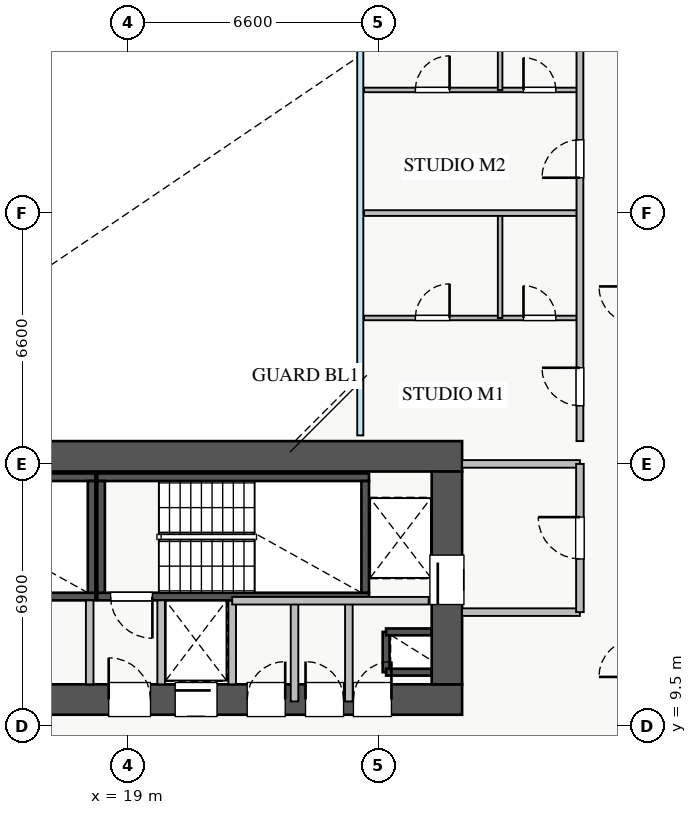
"""IFC4 building model, lengths in metres.
Left out: names, types, materials, properties, quantities, classifications, styles, units other than length and angle.
Written with IfcOpenShell. Run it as: python <this file> out.ifc"""

import sys

from ifc_helpers import new_model, si_unit, direction, frame, frame_2d, origin, place, context, subcontext, project, spatial, rectangle, extrude, source, transform, mapped, element, fill, save


model = new_model("IFC4")
c1 = context("Model", 3, precision=1e-05, world=origin(), true_north=direction((0.0, 1.0)))
c2 = subcontext(c1, "Body", "Model", "MODEL_VIEW")
j1 = project(units=[si_unit("LENGTHUNIT", "METRE"), si_unit("PLANEANGLEUNIT", "RADIAN")], contexts=[c1])
p1 = place(None, origin())
s1 = spatial("IfcSite", under=j1, at=p1, CompositionType="ELEMENT")
p2 = place(p1, origin())
s2 = spatial("IfcBuilding", under=s1, at=p2, CompositionType="ELEMENT")
p3 = place(p2, frame((0.0, 0.0, 56.75)))
s3 = spatial("IfcBuildingStorey", under=s2, at=p3, CompositionType="ELEMENT", Elevation=56.75)
p4 = place(p3, frame((25.8, 10.92, 0.0), z_axis=(0.0, 0.0, 1.0), x_axis=(0.0, 1.0, 0.0)))
e1 = element("IfcWall", 1, at=p4, inside=s3, PredefinedType="SHEAR", context=c2, shape_type="SweptSolid", body=[
    extrude(rectangle(XDim=1.06, YDim=0.18, at=frame_2d((0.53, 0.0))), origin(), (0.0, 0.0, 1.0), 3.07),
])
for number, where, z_axis, x_axis in (
    (2, (25.8, 11.98, 0.0), (0.0, 0.0, 1.0), (1.0, 0.0, 0.0)),
    (3, (25.8, 10.92, 0.0), (0.0, 0.0, 1.0), (1.0, 0.0, 0.0)),
):
    element("IfcWall", number, at=place(p3, frame(where, z_axis=z_axis, x_axis=x_axis)), inside=s3, PredefinedType="SHEAR", context=c2, shape_type="SweptSolid", body=[
        extrude(rectangle(XDim=1.2, YDim=0.18, at=frame_2d((0.6, 0.0))), origin(), (0.0, 0.0, 1.0), 3.07),
    ])
p5 = place(p3, frame((19.88, 12.8, 0.0), z_axis=(0.0, 0.0, 1.0), x_axis=(1.0, 0.0, 0.0)))
e4 = element("IfcWall", 4, at=p5, inside=s3, PredefinedType="SHEAR", context=c2, shape_type="SweptSolid", body=[
    extrude(rectangle(XDim=1.87, YDim=0.18, at=frame_2d((0.935, 0.0))), origin(), (0.0, 0.0, 1.0), 3.07),
])
p6 = place(p3, frame((11.0, 12.91, 0.0), z_axis=(0.0, 0.0, 1.0), x_axis=(1.0, 0.0, 0.0)))
e5 = element("IfcWall", 5, at=p6, inside=s3, PredefinedType="SHEAR", context=c2, shape_type="SweptSolid", body=[
    extrude(rectangle(XDim=7.15, YDim=0.2, at=frame_2d((3.575, 0.0))), origin(), (0.0, 0.0, 1.0), 3.25),
])
p7 = place(p6, frame((0.35, 0.0, 0.0)))
e6 = element("IfcOpeningElement", 6, at=p7, cuts=e5, PredefinedType="OPENING", context=c2, shape_type="SweptSolid", body=[
    extrude(rectangle(XDim=1.1, YDim=2.05, at=frame_2d((0.55, 1.025))), frame((0.0, 0.11, 0.0), z_axis=(0.0, -1.0, 0.0), x_axis=(1.0, 0.0, 0.0)), (0.0, 0.0, 1.0), 0.22),
])
p8 = place(p3, frame((11.0, 16.05, 0.0), z_axis=(0.0, 0.0, 1.0), x_axis=(1.0, 0.0, 0.0)))
e7 = element("IfcWall", 7, at=p8, inside=s3, PredefinedType="SHEAR", context=c2, shape_type="SweptSolid", body=[
    extrude(rectangle(XDim=7.15, YDim=0.2, at=frame_2d((3.575, 0.0))), origin(), (0.0, 0.0, 1.0), 3.25),
])
p9 = place(p3, frame((18.05, 13.01, 0.0), z_axis=(0.0, 0.0, 1.0), x_axis=(0.0, 1.0, 0.0)))
e8 = element("IfcWall", 8, at=p9, inside=s3, PredefinedType="SHEAR", context=c2, shape_type="SweptSolid", body=[
    extrude(rectangle(XDim=2.94, YDim=0.2, at=frame_2d((1.47, 0.0))), origin(), (0.0, 0.0, 1.0), 3.25),
])
p10 = place(p3, frame((18.2, 12.91, 0.0), z_axis=(0.0, 0.0, 1.0), x_axis=(1.0, 0.0, 0.0)))
e9 = element("IfcWall", 9, at=p10, inside=s3, PredefinedType="SHEAR", context=c2, shape_type="SweptSolid", body=[
    extrude(rectangle(XDim=7.15, YDim=0.2, at=frame_2d((3.575, 0.0))), origin(), (0.0, 0.0, 1.0), 3.25),
])
p11 = place(p10, frame((0.35, 0.0, 0.0)))
e10 = element("IfcOpeningElement", 10, at=p11, cuts=e9, PredefinedType="OPENING", context=c2, shape_type="SweptSolid", body=[
    extrude(rectangle(XDim=1.1, YDim=2.05, at=frame_2d((0.55, 1.025))), frame((0.0, 0.11, 0.0), z_axis=(0.0, -1.0, 0.0), x_axis=(1.0, 0.0, 0.0)), (0.0, 0.0, 1.0), 0.22),
])
p12 = place(p3, frame((18.2, 16.05, 0.0), z_axis=(0.0, 0.0, 1.0), x_axis=(1.0, 0.0, 0.0)))
e11 = element("IfcWall", 11, at=p12, inside=s3, PredefinedType="SHEAR", context=c2, shape_type="SweptSolid", body=[
    extrude(rectangle(XDim=7.15, YDim=0.2, at=frame_2d((3.575, 0.0))), origin(), (0.0, 0.0, 1.0), 3.25),
])
for number, where, z_axis, x_axis in (
    (12, (18.3, 13.01, 0.0), (0.0, 0.0, 1.0), (0.0, 1.0, 0.0)),
    (13, (25.25, 13.01, 0.0), (0.0, 0.0, 1.0), (0.0, 1.0, 0.0)),
):
    element("IfcWall", number, at=place(p3, frame(where, z_axis=z_axis, x_axis=x_axis)), inside=s3, PredefinedType="SHEAR", context=c2, shape_type="SweptSolid", body=[
        extrude(rectangle(XDim=2.94, YDim=0.2, at=frame_2d((1.47, 0.0))), origin(), (0.0, 0.0, 1.0), 3.25),
    ])
p13 = place(p3, frame((10.2, 10.2, 0.0), z_axis=(0.0, 0.0, 1.0), x_axis=(1.0, 0.0, 0.0)))
e14 = element("IfcWall", 14, at=p13, inside=s3, PredefinedType="SHEAR", context=c2, shape_type="SweptSolid", body=[
    extrude(rectangle(XDim=17.6, YDim=0.8, at=frame_2d((8.8, 0.0))), origin(), (0.0, 0.0, 1.0), 3.25),
])
p14 = place(p13, frame((1.15, 0.0, 0.0)))
e15 = element("IfcOpeningElement", 15, at=p14, cuts=e14, PredefinedType="OPENING", context=c2, shape_type="SweptSolid", body=[
    extrude(rectangle(XDim=1.1, YDim=2.05, at=frame_2d((0.55, 1.025))), frame((0.0, 0.41, 0.0), z_axis=(0.0, -1.0, 0.0), x_axis=(1.0, 0.0, 0.0)), (0.0, 0.0, 1.0), 0.82),
])
p15 = place(p13, frame((8.3, 0.0, 0.0)))
e16 = element("IfcOpeningElement", 16, at=p15, cuts=e14, PredefinedType="OPENING", context=c2, shape_type="SweptSolid", body=[
    extrude(rectangle(XDim=1.1, YDim=2.05, at=frame_2d((0.55, 1.025))), frame((0.0, 0.41, 0.0), z_axis=(0.0, -1.0, 0.0), x_axis=(1.0, 0.0, 0.0)), (0.0, 0.0, 1.0), 0.82),
])
p16 = place(p13, frame((10.05, 0.0, 0.0)))
e17 = element("IfcOpeningElement", 17, at=p16, cuts=e14, PredefinedType="OPENING", context=c2, shape_type="SweptSolid", body=[
    extrude(rectangle(XDim=1.1, YDim=2.05, at=frame_2d((0.55, 1.025))), frame((0.0, 0.41, 0.0), z_axis=(0.0, -1.0, 0.0), x_axis=(1.0, 0.0, 0.0)), (0.0, 0.0, 1.0), 0.82),
])
p17 = place(p13, frame((14.74, 0.0, 0.0)))
e18 = element("IfcOpeningElement", 18, at=p17, cuts=e14, PredefinedType="OPENING", context=c2, shape_type="SweptSolid", body=[
    extrude(rectangle(XDim=1.0, YDim=2.05, at=frame_2d((0.5, 1.025))), frame((0.0, 0.41, 0.0), z_axis=(0.0, -1.0, 0.0), x_axis=(1.0, 0.0, 0.0)), (0.0, 0.0, 1.0), 0.82),
])
p18 = place(p13, frame((11.945, 0.0, 0.0)))
e19 = element("IfcOpeningElement", 19, at=p18, cuts=e14, PredefinedType="OPENING", context=c2, shape_type="SweptSolid", body=[
    extrude(rectangle(XDim=1.0, YDim=2.05, at=frame_2d((0.5, 1.025))), frame((0.0, 0.41, 0.0), z_axis=(0.0, -1.0, 0.0), x_axis=(1.0, 0.0, 0.0)), (0.0, 0.0, 1.0), 0.82),
])
p19 = place(p13, frame((13.48, 0.0, 0.0)))
e20 = element("IfcOpeningElement", 20, at=p19, cuts=e14, PredefinedType="OPENING", context=c2, shape_type="SweptSolid", body=[
    extrude(rectangle(XDim=1.0, YDim=2.05, at=frame_2d((0.5, 1.025))), frame((0.0, 0.41, 0.0), z_axis=(0.0, -1.0, 0.0), x_axis=(1.0, 0.0, 0.0)), (0.0, 0.0, 1.0), 0.82),
])
p20 = place(p3, frame((10.2, 16.6, 0.0), z_axis=(0.0, 0.0, 1.0), x_axis=(1.0, 0.0, 0.0)))
e21 = element("IfcWall", 21, at=p20, inside=s3, PredefinedType="SHEAR", context=c2, shape_type="SweptSolid", body=[
    extrude(rectangle(XDim=17.6, YDim=0.8, at=frame_2d((8.8, 0.0))), origin(), (0.0, 0.0, 1.0), 3.25),
])
p21 = place(p3, frame((27.4, 10.6, 0.0), z_axis=(0.0, 0.0, 1.0), x_axis=(0.0, 1.0, 0.0)))
e22 = element("IfcWall", 22, at=p21, inside=s3, PredefinedType="SHEAR", context=c2, shape_type="SweptSolid", body=[
    extrude(rectangle(XDim=5.6, YDim=0.8, at=frame_2d((2.8, 0.0))), origin(), (0.0, 0.0, 1.0), 3.25),
])
p22 = place(p21, frame((2.1, 0.0, 0.0)))
e23 = element("IfcOpeningElement", 23, at=p22, cuts=e22, PredefinedType="OPENING", context=c2, shape_type="SweptSolid", body=[
    extrude(rectangle(XDim=1.3, YDim=2.05, at=frame_2d((0.65, 1.025))), frame((0.0, 0.41, 0.0), z_axis=(0.0, -1.0, 0.0), x_axis=(1.0, 0.0, 0.0)), (0.0, 0.0, 1.0), 0.82),
])
for number, where, z_axis, x_axis in (
    (24, (27.8, 16.4, 0.0), (0.0, 0.0, 1.0), (1.0, 0.0, 0.0)),
    (25, (27.8, 12.5, 0.0), (0.0, 0.0, 1.0), (1.0, 0.0, 0.0)),
):
    element("IfcWall", number, at=place(p3, frame(where, z_axis=z_axis, x_axis=x_axis)), inside=s3, PredefinedType="PARTITIONING", context=c2, shape_type="SweptSolid", body=[
        extrude(rectangle(XDim=3.1, YDim=0.2, at=frame_2d((1.55, 0.0))), origin(), (0.0, 0.0, 1.0), 3.07),
    ])
p23 = place(p3, frame((30.9, 12.5, 0.0), z_axis=(0.0, 0.0, 1.0), x_axis=(0.0, 1.0, 0.0)))
e26 = element("IfcWall", 26, at=p23, inside=s3, PredefinedType="PARTITIONING", context=c2, shape_type="SweptSolid", body=[
    extrude(rectangle(XDim=3.9, YDim=0.2, at=frame_2d((1.95, 0.0))), origin(), (0.0, 0.0, 1.0), 3.07),
])
p24 = place(p23, frame((1.4, 0.0, 0.0)))
e27 = element("IfcOpeningElement", 27, at=p24, cuts=e26, PredefinedType="OPENING", context=c2, shape_type="SweptSolid", body=[
    extrude(rectangle(XDim=1.1, YDim=2.05, at=frame_2d((0.55, 1.025))), frame((0.0, 0.11, 0.0), z_axis=(0.0, -1.0, 0.0), x_axis=(1.0, 0.0, 0.0)), (0.0, 0.0, 1.0), 0.22),
])
for number, where, z_axis, x_axis in (
    (28, (18.0, 10.6, 0.0), (0.0, 0.0, 1.0), (0.0, 1.0, 0.0)),
    (29, (19.88, 10.6, 0.0), (0.0, 0.0, 1.0), (0.0, 1.0, 0.0)),
):
    element("IfcWall", number, at=place(p3, frame(where, z_axis=z_axis, x_axis=x_axis)), inside=s3, PredefinedType="PARTITIONING", context=c2, shape_type="SweptSolid", body=[
        extrude(rectangle(XDim=2.21, YDim=0.2, at=frame_2d((1.105, 0.0))), origin(), (0.0, 0.0, 1.0), 3.07),
    ])
p25 = place(p3, frame((24.82, 10.15, 0.0), z_axis=(0.0, 0.0, 1.0), x_axis=(0.0, 1.0, 0.0)))
e30 = element("IfcWall", 30, at=p25, inside=s3, PredefinedType="PARTITIONING", context=c2, shape_type="SweptSolid", body=[
    extrude(rectangle(XDim=2.65, YDim=0.2, at=frame_2d((1.325, 0.0))), origin(), (0.0, 0.0, 1.0), 3.07),
])
p26 = place(p3, frame((21.75, 10.6, 0.0), z_axis=(0.0, 0.0, 1.0), x_axis=(0.0, 1.0, 0.0)))
e31 = element("IfcWall", 31, at=p26, inside=s3, PredefinedType="PARTITIONING", context=c2, shape_type="SweptSolid", body=[
    extrude(rectangle(XDim=2.2, YDim=0.2, at=frame_2d((1.1, 0.0))), origin(), (0.0, 0.0, 1.0), 3.07),
])
p27 = place(p3, frame((23.39, 10.15, 0.0), z_axis=(0.0, 0.0, 1.0), x_axis=(0.0, 1.0, 0.0)))
e32 = element("IfcWall", 32, at=p27, inside=s3, PredefinedType="PARTITIONING", context=c2, shape_type="SweptSolid", body=[
    extrude(rectangle(XDim=2.65, YDim=0.2, at=frame_2d((1.325, 0.0))), origin(), (0.0, 0.0, 1.0), 3.07),
])
p28 = place(p3, frame((21.75, 12.8, 0.0), z_axis=(0.0, 0.0, 1.0), x_axis=(1.0, 0.0, 0.0)))
e33 = element("IfcWall", 33, at=p28, inside=s3, PredefinedType="PARTITIONING", context=c2, shape_type="SweptSolid", body=[
    extrude(rectangle(XDim=5.17, YDim=0.2, at=frame_2d((2.585, 0.0))), origin(), (0.0, 0.0, 1.0), 3.07),
])
p29 = place(p3, frame((25.22, 20.24, 0.0), z_axis=(0.0, 0.0, 1.0), x_axis=(1.0, 0.0, 0.0)))
e34 = element("IfcWall", 34, at=p29, inside=s3, PredefinedType="PLUMBINGWALL", context=c2, shape_type="SweptSolid", body=[
    extrude(rectangle(XDim=5.68, YDim=0.12, at=frame_2d((2.84, 0.0))), origin(), (0.0, 0.0, 1.0), 2.625),
])
p30 = place(p29, frame((1.35, 0.0, 0.0)))
e35 = element("IfcOpeningElement", 35, at=p30, cuts=e34, PredefinedType="OPENING", context=c2, shape_type="SweptSolid", body=[
    extrude(rectangle(XDim=0.9, YDim=2.05, at=frame_2d((0.45, 1.025))), frame((0.0, 0.07, 0.0), z_axis=(0.0, -1.0, 0.0), x_axis=(1.0, 0.0, 0.0)), (0.0, 0.0, 1.0), 0.14),
])
p31 = place(p29, frame((4.195, 0.0, 0.0)))
e36 = element("IfcOpeningElement", 36, at=p31, cuts=e34, PredefinedType="OPENING", context=c2, shape_type="SweptSolid", body=[
    extrude(rectangle(XDim=0.85, YDim=2.05, at=frame_2d((0.425, 1.025))), frame((0.0, 0.07, 0.0), z_axis=(0.0, -1.0, 0.0), x_axis=(1.0, 0.0, 0.0)), (0.0, 0.0, 1.0), 0.14),
])
p32 = place(p3, frame((28.8, 20.24, 0.0), z_axis=(0.0, 0.0, 1.0), x_axis=(0.0, 1.0, 0.0)))
e37 = element("IfcWall", 37, at=p32, inside=s3, PredefinedType="PLUMBINGWALL", context=c2, shape_type="SweptSolid", body=[
    extrude(rectangle(XDim=2.76, YDim=0.12, at=frame_2d((1.38, 0.0))), origin(), (0.0, 0.0, 1.0), 3.07),
])
p33 = place(p3, frame((25.22, 26.24, 0.0), z_axis=(0.0, 0.0, 1.0), x_axis=(1.0, 0.0, 0.0)))
e38 = element("IfcWall", 38, at=p33, inside=s3, PredefinedType="PLUMBINGWALL", context=c2, shape_type="SweptSolid", body=[
    extrude(rectangle(XDim=5.68, YDim=0.12, at=frame_2d((2.84, 0.0))), origin(), (0.0, 0.0, 1.0), 2.625),
])
p34 = place(p33, frame((1.35, 0.0, 0.0)))
e39 = element("IfcOpeningElement", 39, at=p34, cuts=e38, PredefinedType="OPENING", context=c2, shape_type="SweptSolid", body=[
    extrude(rectangle(XDim=0.9, YDim=2.05, at=frame_2d((0.45, 1.025))), frame((0.0, 0.07, 0.0), z_axis=(0.0, -1.0, 0.0), x_axis=(1.0, 0.0, 0.0)), (0.0, 0.0, 1.0), 0.14),
])
p35 = place(p33, frame((4.195, 0.0, 0.0)))
e40 = element("IfcOpeningElement", 40, at=p35, cuts=e38, PredefinedType="OPENING", context=c2, shape_type="SweptSolid", body=[
    extrude(rectangle(XDim=0.85, YDim=2.05, at=frame_2d((0.425, 1.025))), frame((0.0, 0.07, 0.0), z_axis=(0.0, -1.0, 0.0), x_axis=(1.0, 0.0, 0.0)), (0.0, 0.0, 1.0), 0.14),
])
p36 = place(p3, frame((28.8, 26.24, 0.0), z_axis=(0.0, 0.0, 1.0), x_axis=(0.0, 1.0, 0.0)))
e41 = element("IfcWall", 41, at=p36, inside=s3, PredefinedType="PLUMBINGWALL", context=c2, shape_type="SweptSolid", body=[
    extrude(rectangle(XDim=2.76, YDim=0.12, at=frame_2d((1.38, 0.0))), origin(), (0.0, 0.0, 1.0), 3.07),
])
p37 = place(p3, frame((25.22, 23.0, 0.0), z_axis=(0.0, 0.0, 1.0), x_axis=(1.0, 0.0, 0.0)))
e42 = element("IfcWall", 42, at=p37, inside=s3, PredefinedType="PARTITIONING", context=c2, shape_type="SweptSolid", body=[
    extrude(rectangle(XDim=5.68, YDim=0.15, at=frame_2d((2.84, 0.0))), origin(), (0.0, 0.0, 1.0), 3.07),
])
p38 = place(p3, frame((30.9, 17.0, 0.0), z_axis=(0.0, 0.0, 1.0), x_axis=(0.0, 1.0, 0.0)))
e43 = element("IfcWall", 43, at=p38, inside=s3, PredefinedType="PARTITIONING", context=c2, shape_type="SweptSolid", body=[
    extrude(rectangle(XDim=12.0, YDim=0.18, at=frame_2d((6.0, 0.0))), origin(), (0.0, 0.0, 1.0), 3.07),
])
p39 = place(p38, frame((0.93, 0.0, 0.0)))
e44 = element("IfcOpeningElement", 44, at=p39, cuts=e43, PredefinedType="OPENING", context=c2, shape_type="SweptSolid", body=[
    extrude(rectangle(XDim=1.0, YDim=2.05, at=frame_2d((0.5, 1.025))), frame((0.0, 0.1, 0.0), z_axis=(0.0, -1.0, 0.0), x_axis=(1.0, 0.0, 0.0)), (0.0, 0.0, 1.0), 0.2),
])
p40 = place(p38, frame((6.93, 0.0, 0.0)))
e45 = element("IfcOpeningElement", 45, at=p40, cuts=e43, PredefinedType="OPENING", context=c2, shape_type="SweptSolid", body=[
    extrude(rectangle(XDim=1.0, YDim=2.05, at=frame_2d((0.5, 1.025))), frame((0.0, 0.1, 0.0), z_axis=(0.0, -1.0, 0.0), x_axis=(1.0, 0.0, 0.0)), (0.0, 0.0, 1.0), 0.2),
])
m1 = source(origin(), c2, "Body", "SweptSolid", [
    extrude(rectangle(XDim=1.3, YDim=2.05, at=frame_2d((0.65, 1.025))), frame((0.0, 0.025, 0.0), z_axis=(0.0, -1.0, 0.0), x_axis=(1.0, 0.0, 0.0)), (0.0, 0.0, 1.0), 0.05),
])
p41 = place(p22, origin())
e46 = element("IfcDoor", 46, at=p41, inside=s3, OperationType="SLIDING_TO_RIGHT", PredefinedType="DOOR", context=c2, shape_type="MappedRepresentation", body=[
    mapped(m1, transform((0.0, 0.0, 0.0), x_axis=(1.0, 0.0, 0.0), y_axis=(0.0, 1.0, 0.0), z_axis=(0.0, 0.0, 1.0), scale=1.0)),
])
fill(e23, e46)
m2 = source(origin(), c2, "Body", "SweptSolid", [
    extrude(rectangle(XDim=1.1, YDim=2.05, at=frame_2d((0.55, 1.025))), frame((0.0, 0.025, 0.0), z_axis=(0.0, -1.0, 0.0), x_axis=(1.0, 0.0, 0.0)), (0.0, 0.0, 1.0), 0.05),
])
p42 = place(p15, origin())
e47 = element("IfcDoor", 47, at=p42, inside=s3, OperationType="SINGLE_SWING_LEFT", PredefinedType="DOOR", context=c2, shape_type="MappedRepresentation", body=[
    mapped(m2, transform((0.0, 0.0, 0.0), x_axis=(1.0, 0.0, 0.0), y_axis=(0.0, 1.0, 0.0), z_axis=(0.0, 0.0, 1.0), scale=1.0)),
])
fill(e16, e47)
p43 = place(p11, frame((1.1, 0.0, 0.0), z_axis=(0.0, 0.0, 1.0), x_axis=(-1.0, 0.0, 0.0)))
e48 = element("IfcDoor", 48, at=p43, inside=s3, OperationType="SINGLE_SWING_RIGHT", PredefinedType="DOOR", context=c2, shape_type="MappedRepresentation", body=[
    mapped(m2, transform((0.0, 0.0, 0.0), x_axis=(1.0, 0.0, 0.0), y_axis=(0.0, 1.0, 0.0), z_axis=(0.0, 0.0, 1.0), scale=1.0)),
])
fill(e10, e48)
p44 = place(p16, origin())
e49 = element("IfcDoor", 49, at=p44, inside=s3, OperationType="SLIDING_TO_RIGHT", PredefinedType="DOOR", context=c2, shape_type="MappedRepresentation", body=[
    mapped(m2, transform((0.0, 0.0, 0.0), x_axis=(1.0, 0.0, 0.0), y_axis=(0.0, 1.0, 0.0), z_axis=(0.0, 0.0, 1.0), scale=1.0)),
])
fill(e17, e49)
m3 = source(origin(), c2, "Body", "SweptSolid", [
    extrude(rectangle(XDim=1.0, YDim=2.05, at=frame_2d((0.5, 1.025))), frame((0.0, 0.025, 0.0), z_axis=(0.0, -1.0, 0.0), x_axis=(1.0, 0.0, 0.0)), (0.0, 0.0, 1.0), 0.05),
])
p45 = place(p17, origin())
e50 = element("IfcDoor", 50, at=p45, inside=s3, OperationType="SINGLE_SWING_RIGHT", PredefinedType="DOOR", context=c2, shape_type="MappedRepresentation", body=[
    mapped(m3, transform((0.0, 0.0, 0.0), x_axis=(1.0, 0.0, 0.0), y_axis=(0.0, 1.0, 0.0), z_axis=(0.0, 0.0, 1.0), scale=1.0)),
])
fill(e18, e50)
p46 = place(p18, origin())
e51 = element("IfcDoor", 51, at=p46, inside=s3, OperationType="SINGLE_SWING_RIGHT", PredefinedType="DOOR", context=c2, shape_type="MappedRepresentation", body=[
    mapped(m3, transform((0.0, 0.0, 0.0), x_axis=(1.0, 0.0, 0.0), y_axis=(0.0, 1.0, 0.0), z_axis=(0.0, 0.0, 1.0), scale=1.0)),
])
fill(e19, e51)
p47 = place(p19, origin())
e52 = element("IfcDoor", 52, at=p47, inside=s3, OperationType="SINGLE_SWING_LEFT", PredefinedType="DOOR", context=c2, shape_type="MappedRepresentation", body=[
    mapped(m3, transform((0.0, 0.0, 0.0), x_axis=(1.0, 0.0, 0.0), y_axis=(0.0, 1.0, 0.0), z_axis=(0.0, 0.0, 1.0), scale=1.0)),
])
fill(e20, e52)
p48 = place(p24, origin())
e53 = element("IfcDoor", 53, at=p48, inside=s3, OperationType="SINGLE_SWING_RIGHT", PredefinedType="DOOR", context=c2, shape_type="MappedRepresentation", body=[
    mapped(m2, transform((0.0, 0.0, 0.0), x_axis=(1.0, 0.0, 0.0), y_axis=(0.0, 1.0, 0.0), z_axis=(0.0, 0.0, 1.0), scale=1.0)),
])
fill(e27, e53)
m4 = source(origin(), c2, "Body", "SweptSolid", [
    extrude(rectangle(XDim=0.9, YDim=2.05, at=frame_2d((0.45, 1.025))), frame((0.0, 0.025, 0.0), z_axis=(0.0, -1.0, 0.0), x_axis=(1.0, 0.0, 0.0)), (0.0, 0.0, 1.0), 0.05),
])
p49 = place(p30, origin())
e54 = element("IfcDoor", 54, at=p49, inside=s3, OperationType="SINGLE_SWING_RIGHT", PredefinedType="DOOR", context=c2, shape_type="MappedRepresentation", body=[
    mapped(m4, transform((0.0, 0.0, 0.0), x_axis=(1.0, 0.0, 0.0), y_axis=(0.0, 1.0, 0.0), z_axis=(0.0, 0.0, 1.0), scale=1.0)),
])
fill(e35, e54)
m5 = source(origin(), c2, "Body", "SweptSolid", [
    extrude(rectangle(XDim=0.85, YDim=2.05, at=frame_2d((0.425, 1.025))), frame((0.0, 0.025, 0.0), z_axis=(0.0, -1.0, 0.0), x_axis=(1.0, 0.0, 0.0)), (0.0, 0.0, 1.0), 0.05),
])
p50 = place(p31, origin())
e55 = element("IfcDoor", 55, at=p50, inside=s3, OperationType="SINGLE_SWING_LEFT", PredefinedType="DOOR", context=c2, shape_type="MappedRepresentation", body=[
    mapped(m5, transform((0.0, 0.0, 0.0), x_axis=(1.0, 0.0, 0.0), y_axis=(0.0, 1.0, 0.0), z_axis=(0.0, 0.0, 1.0), scale=1.0)),
])
fill(e36, e55)
p51 = place(p34, origin())
e56 = element("IfcDoor", 56, at=p51, inside=s3, OperationType="SINGLE_SWING_RIGHT", PredefinedType="DOOR", context=c2, shape_type="MappedRepresentation", body=[
    mapped(m4, transform((0.0, 0.0, 0.0), x_axis=(1.0, 0.0, 0.0), y_axis=(0.0, 1.0, 0.0), z_axis=(0.0, 0.0, 1.0), scale=1.0)),
])
fill(e39, e56)
p52 = place(p35, origin())
e57 = element("IfcDoor", 57, at=p52, inside=s3, OperationType="SINGLE_SWING_LEFT", PredefinedType="DOOR", context=c2, shape_type="MappedRepresentation", body=[
    mapped(m5, transform((0.0, 0.0, 0.0), x_axis=(1.0, 0.0, 0.0), y_axis=(0.0, 1.0, 0.0), z_axis=(0.0, 0.0, 1.0), scale=1.0)),
])
fill(e40, e57)
p53 = place(p39, origin())
e58 = element("IfcDoor", 58, at=p53, inside=s3, OperationType="SINGLE_SWING_RIGHT", PredefinedType="DOOR", context=c2, shape_type="MappedRepresentation", body=[
    mapped(m3, transform((0.0, 0.0, 0.0), x_axis=(1.0, 0.0, 0.0), y_axis=(0.0, 1.0, 0.0), z_axis=(0.0, 0.0, 1.0), scale=1.0)),
])
fill(e44, e58)
p54 = place(p40, origin())
e59 = element("IfcDoor", 59, at=p54, inside=s3, OperationType="SINGLE_SWING_LEFT", PredefinedType="DOOR", context=c2, shape_type="MappedRepresentation", body=[
    mapped(m3, transform((0.0, 0.0, 0.0), x_axis=(1.0, 0.0, 0.0), y_axis=(0.0, 1.0, 0.0), z_axis=(0.0, 0.0, 1.0), scale=1.0)),
])
fill(e45, e59)
save(model, sys.argv[1])
